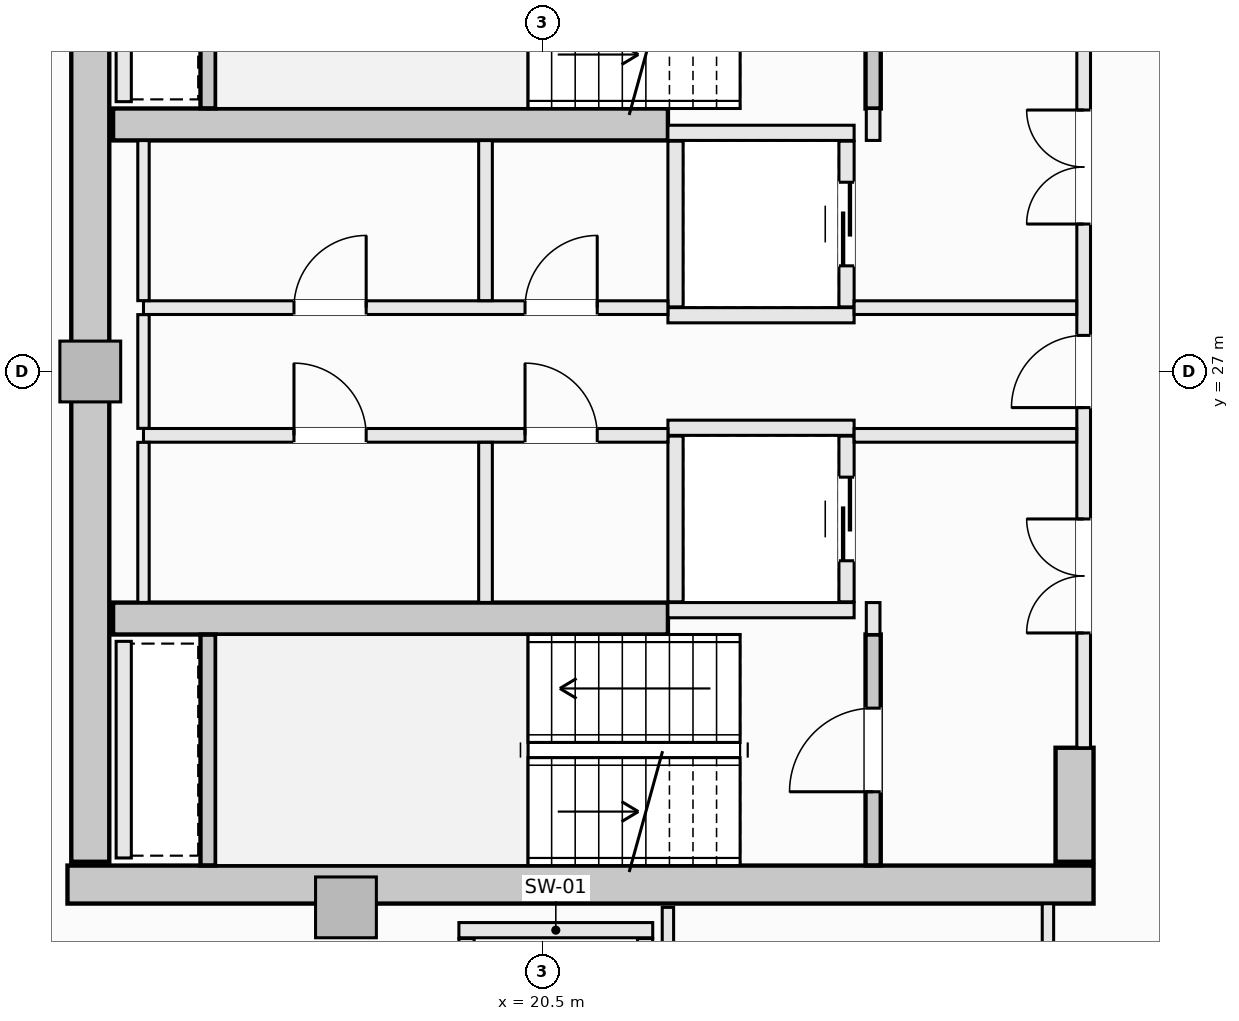
"""IFC4 building model, lengths in metres.
Left out: names, types, materials, properties, quantities, classifications, styles, units other than length and angle.
Written with IfcOpenShell. Run it as: python <this file> out.ifc"""

import sys

from ifc_helpers import new_model, si_unit, direction, frame, frame_2d, origin, origin_2d, place, context, subcontext, project, spatial, rectangle, extrude, element, fill, save


model = new_model("IFC4")
c1 = context("Model", 3, precision=1e-05, world=origin(), true_north=direction((0.0, 1.0)))
c2 = subcontext(c1, "Body", "Model", "MODEL_VIEW")
j1 = project(units=[si_unit("LENGTHUNIT", "METRE"), si_unit("PLANEANGLEUNIT", "RADIAN")], contexts=[c1])
p1 = place(None, origin())
s1 = spatial("IfcSite", under=j1, at=p1, CompositionType="ELEMENT")
p2 = place(p1, origin())
s2 = spatial("IfcBuilding", under=s1, at=p2, CompositionType="ELEMENT")
p3 = place(p2, frame((0.0, 0.0, 269.0)))
s3 = spatial("IfcBuildingStorey", under=s2, at=p3, CompositionType="ELEMENT", Elevation=269.0)
p4 = place(p3, frame((14.25, 20.25, -0.27), z_axis=(0.0, 0.0, 1.0), x_axis=(1.0, 0.0, 0.0)))
e1 = element("IfcWall", 1, at=p4, inside=s3, PredefinedType="SHEAR", context=c2, shape_type="SweptSolid", body=[
    extrude(rectangle(XDim=13.5, YDim=0.5, at=frame_2d((6.75, 0.0))), origin(), (0.0, 0.0, 1.0), 3.3),
])
p5 = place(p3, frame((14.55, 20.55, -0.27), z_axis=(0.0, 0.0, 1.0), x_axis=(0.0, 1.0, 0.0)))
e2 = element("IfcWall", 2, at=p5, inside=s3, PredefinedType="SHEAR", context=c2, shape_type="SweptSolid", body=[
    extrude(rectangle(XDim=12.9, YDim=0.5, at=frame_2d((6.45, 0.0))), origin(), (0.0, 0.0, 1.0), 3.3),
])
p6 = place(p3, frame((27.5, 20.55, -0.27), z_axis=(0.0, 0.0, 1.0), x_axis=(0.0, 1.0, 0.0)))
e3 = element("IfcWall", 3, at=p6, inside=s3, PredefinedType="SHEAR", context=c2, shape_type="SweptSolid", body=[
    extrude(rectangle(XDim=1.5, YDim=0.5, at=frame_2d((0.75, 0.0))), origin(), (0.0, 0.0, 1.0), 3.3),
])
for number, where, z_axis, x_axis in (
    (4, (14.85, 30.25, -0.27), (0.0, 0.0, 1.0), (1.0, 0.0, 0.0)),
    (5, (14.85, 23.75, -0.27), (0.0, 0.0, 1.0), (1.0, 0.0, 0.0)),
):
    element("IfcWall", number, at=place(p3, frame(where, z_axis=z_axis, x_axis=x_axis)), inside=s3, PredefinedType="SHEAR", context=c2, shape_type="SweptSolid", body=[
        extrude(rectangle(XDim=7.3, YDim=0.42, at=frame_2d((3.65, 0.0))), origin(), (0.0, 0.0, 1.0), 3.3),
    ])
for number, where, z_axis, x_axis in (
    (6, (14.55, 27.0, -0.27), (0.0, 0.0, 1.0), (1.0, 0.0, 0.0)),
    (7, (17.914, 19.95, -0.27), (0.0, 0.0, 1.0), (1.0, 0.0, 0.0)),
):
    element("IfcColumn", number, at=place(p3, frame(where, z_axis=z_axis, x_axis=x_axis)), inside=s3, PredefinedType="PILASTER", context=c2, shape_type="SweptSolid", body=[
        extrude(rectangle(XDim=0.8, YDim=0.8, at=origin_2d()), origin(), (0.0, 0.0, 1.0), 3.3),
    ])
p7 = place(p3, frame((24.85, 30.46, -0.27), z_axis=(0.0, 0.0, 1.0), x_axis=(0.0, 1.0, 0.0)))
e8 = element("IfcWall", 8, at=p7, inside=s3, PredefinedType="SHEAR", context=c2, shape_type="SweptSolid", body=[
    extrude(rectangle(XDim=3.038, YDim=0.2, at=frame_2d((1.519, 0.0))), origin(), (0.0, 0.0, 1.0), 3.3),
])
p8 = place(p7, frame((0.969, 0.0, 0.27)))
e9 = element("IfcOpeningElement", 9, at=p8, cuts=e8, PredefinedType="OPENING", context=c2, shape_type="SweptSolid", body=[
    extrude(rectangle(XDim=1.1, YDim=2.15, at=frame_2d((0.55, 1.075))), frame((0.0, 0.11, 0.0), z_axis=(0.0, -1.0, 0.0), x_axis=(1.0, 0.0, 0.0)), (0.0, 0.0, 1.0), 0.22),
])
p9 = place(p3, frame((16.1, 30.462, -0.27), z_axis=(0.0, 0.0, 1.0), x_axis=(0.0, 1.0, 0.0)))
e10 = element("IfcWall", 10, at=p9, inside=s3, PredefinedType="SHEAR", context=c2, shape_type="SweptSolid", body=[
    extrude(rectangle(XDim=3.036, YDim=0.2, at=frame_2d((1.518, 0.0))), origin(), (0.0, 0.0, 1.0), 3.3),
])
p10 = place(p3, frame((24.85, 20.502, -0.27), z_axis=(0.0, 0.0, 1.0), x_axis=(0.0, 1.0, 0.0)))
e11 = element("IfcWall", 11, at=p10, inside=s3, PredefinedType="SHEAR", context=c2, shape_type="SweptSolid", body=[
    extrude(rectangle(XDim=3.038, YDim=0.2, at=frame_2d((1.519, 0.0))), origin(), (0.0, 0.0, 1.0), 3.3),
])
p11 = place(p10, frame((0.969, 0.0, 0.27)))
e12 = element("IfcOpeningElement", 12, at=p11, cuts=e11, PredefinedType="OPENING", context=c2, shape_type="SweptSolid", body=[
    extrude(rectangle(XDim=1.1, YDim=2.15, at=frame_2d((0.55, 1.075))), frame((0.0, 0.11, 0.0), z_axis=(0.0, -1.0, 0.0), x_axis=(1.0, 0.0, 0.0)), (0.0, 0.0, 1.0), 0.22),
])
p12 = place(p3, frame((16.1, 20.502, -0.27), z_axis=(0.0, 0.0, 1.0), x_axis=(0.0, 1.0, 0.0)))
e13 = element("IfcWall", 13, at=p12, inside=s3, PredefinedType="SHEAR", context=c2, shape_type="SweptSolid", body=[
    extrude(rectangle(XDim=3.036, YDim=0.2, at=frame_2d((1.518, 0.0))), origin(), (0.0, 0.0, 1.0), 3.3),
])
for number, where, z_axis, x_axis in (
    (14, (22.15, 30.14, 0.0), (0.0, 0.0, 1.0), (1.0, 0.0, 0.0)),
    (15, (22.15, 27.74, 0.0), (0.0, 0.0, 1.0), (1.0, 0.0, 0.0)),
):
    element("IfcWall", number, at=place(p3, frame(where, z_axis=z_axis, x_axis=x_axis)), inside=s3, PredefinedType="SOLIDWALL", context=c2, shape_type="SweptSolid", body=[
        extrude(rectangle(XDim=2.45, YDim=0.2, at=frame_2d((1.225, 0.0))), origin(), (0.0, 0.0, 1.0), 3.03),
    ])
p13 = place(p3, frame((22.25, 27.85, 0.0), z_axis=(0.0, 0.0, 1.0), x_axis=(0.0, 1.0, 0.0)))
e16 = element("IfcWall", 16, at=p13, inside=s3, PredefinedType="SOLIDWALL", context=c2, shape_type="SweptSolid", body=[
    extrude(rectangle(XDim=2.18, YDim=0.2, at=frame_2d((1.09, 0.0))), origin(), (0.0, 0.0, 1.0), 3.03),
])
p14 = place(p3, frame((24.5, 27.85, 0.0), z_axis=(0.0, 0.0, 1.0), x_axis=(0.0, 1.0, 0.0)))
e17 = element("IfcWall", 17, at=p14, inside=s3, PredefinedType="SOLIDWALL", context=c2, shape_type="SweptSolid", body=[
    extrude(rectangle(XDim=2.18, YDim=0.2, at=frame_2d((1.09, 0.0))), origin(), (0.0, 0.0, 1.0), 3.03),
])
p15 = place(p14, frame((0.54, 0.0, 0.0)))
e18 = element("IfcOpeningElement", 18, at=p15, cuts=e17, PredefinedType="OPENING", context=c2, shape_type="SweptSolid", body=[
    extrude(rectangle(XDim=1.1, YDim=2.2, at=frame_2d((0.55, 1.1))), frame((0.0, 0.11, 0.0), z_axis=(0.0, -1.0, 0.0), x_axis=(1.0, 0.0, 0.0)), (0.0, 0.0, 1.0), 0.22),
])
for number, where, z_axis, x_axis in (
    (19, (22.15, 26.26, 0.0), (0.0, 0.0, 1.0), (1.0, 0.0, 0.0)),
    (20, (22.15, 23.86, 0.0), (0.0, 0.0, 1.0), (1.0, 0.0, 0.0)),
):
    element("IfcWall", number, at=place(p3, frame(where, z_axis=z_axis, x_axis=x_axis)), inside=s3, PredefinedType="SOLIDWALL", context=c2, shape_type="SweptSolid", body=[
        extrude(rectangle(XDim=2.45, YDim=0.2, at=frame_2d((1.225, 0.0))), origin(), (0.0, 0.0, 1.0), 3.03),
    ])
p16 = place(p3, frame((22.25, 23.97, 0.0), z_axis=(0.0, 0.0, 1.0), x_axis=(0.0, 1.0, 0.0)))
e21 = element("IfcWall", 21, at=p16, inside=s3, PredefinedType="SOLIDWALL", context=c2, shape_type="SweptSolid", body=[
    extrude(rectangle(XDim=2.18, YDim=0.2, at=frame_2d((1.09, 0.0))), origin(), (0.0, 0.0, 1.0), 3.03),
])
p17 = place(p3, frame((24.5, 23.97, 0.0), z_axis=(0.0, 0.0, 1.0), x_axis=(0.0, 1.0, 0.0)))
e22 = element("IfcWall", 22, at=p17, inside=s3, PredefinedType="SOLIDWALL", context=c2, shape_type="SweptSolid", body=[
    extrude(rectangle(XDim=2.18, YDim=0.2, at=frame_2d((1.09, 0.0))), origin(), (0.0, 0.0, 1.0), 3.03),
])
p18 = place(p17, frame((0.54, 0.0, 0.0)))
e23 = element("IfcOpeningElement", 23, at=p18, cuts=e22, PredefinedType="OPENING", context=c2, shape_type="SweptSolid", body=[
    extrude(rectangle(XDim=1.1, YDim=2.2, at=frame_2d((0.55, 1.1))), frame((0.0, 0.11, 0.0), z_axis=(0.0, -1.0, 0.0), x_axis=(1.0, 0.0, 0.0)), (0.0, 0.0, 1.0), 0.22),
])
p19 = place(p3, frame((19.4, 19.65, 0.0), z_axis=(0.0, 0.0, 1.0), x_axis=(1.0, 0.0, 0.0)))
e24 = element("IfcWall", 24, at=p19, inside=s3, PredefinedType="SOLIDWALL", context=c2, shape_type="SweptSolid", body=[
    extrude(rectangle(XDim=2.55, YDim=0.2, at=frame_2d((1.275, 0.0))), origin(), (0.0, 0.0, 1.0), 3.03),
])
for number, where, z_axis, x_axis in (
    (25, (19.5, 17.01, 0.0), (0.0, 0.0, 1.0), (0.0, 1.0, 0.0)),
    (26, (21.85, 17.01, 0.0), (0.0, 0.0, 1.0), (0.0, 1.0, 0.0)),
):
    element("IfcWall", number, at=place(p3, frame(where, z_axis=z_axis, x_axis=x_axis)), inside=s3, PredefinedType="SOLIDWALL", context=c2, shape_type="SweptSolid", body=[
        extrude(rectangle(XDim=2.53, YDim=0.2, at=frame_2d((1.265, 0.0))), origin(), (0.0, 0.0, 1.0), 3.03),
    ])
for number, where, z_axis, x_axis in (
    (27, (14.99, 30.55, 0.0), (0.0, 0.0, 1.0), (0.0, 1.0, 0.0)),
    (28, (14.99, 20.6, 0.0), (0.0, 0.0, 1.0), (0.0, 1.0, 0.0)),
):
    element("IfcWall", number, at=place(p3, frame(where, z_axis=z_axis, x_axis=x_axis)), inside=s3, PredefinedType="SOLIDWALL", context=c2, shape_type="SweptSolid", body=[
        extrude(rectangle(XDim=2.85, YDim=0.2, at=frame_2d((1.425, 0.0))), origin(), (0.0, 0.0, 1.0), 3.03),
    ])
for number, where, z_axis, x_axis in (
    (29, (24.85, 23.54, 0.0), (0.0, 0.0, 1.0), (0.0, 1.0, 0.0)),
    (30, (24.85, 30.04, 0.0), (0.0, 0.0, 1.0), (0.0, 1.0, 0.0)),
):
    element("IfcWall", number, at=place(p3, frame(where, z_axis=z_axis, x_axis=x_axis)), inside=s3, PredefinedType="SOLIDWALL", context=c2, shape_type="SweptSolid", body=[
        extrude(rectangle(XDim=0.42, YDim=0.18, at=frame_2d((0.21, 0.0))), origin(), (0.0, 0.0, 1.0), 3.03),
    ])
p20 = place(p3, frame((27.62, 22.05, 0.0), z_axis=(0.0, 0.0, 1.0), x_axis=(0.0, 1.0, 0.0)))
e31 = element("IfcWall", 31, at=p20, inside=s3, PredefinedType="SOLIDWALL", context=c2, shape_type="SweptSolid", body=[
    extrude(rectangle(XDim=9.9, YDim=0.18, at=frame_2d((4.95, 0.0))), origin(), (0.0, 0.0, 1.0), 3.03),
])
p21 = place(p20, frame((4.475, 0.0, 0.0)))
e32 = element("IfcOpeningElement", 32, at=p21, cuts=e31, PredefinedType="OPENING", context=c2, shape_type="SweptSolid", body=[
    extrude(rectangle(XDim=0.95, YDim=2.1, at=frame_2d((0.475, 1.05))), frame((0.0, 0.1, 0.0), z_axis=(0.0, -1.0, 0.0), x_axis=(1.0, 0.0, 0.0)), (0.0, 0.0, 1.0), 0.2),
])
p22 = place(p20, frame((6.89, 0.0, 0.0)))
e33 = element("IfcOpeningElement", 33, at=p22, cuts=e31, PredefinedType="OPENING", context=c2, shape_type="SweptSolid", body=[
    extrude(rectangle(XDim=1.5, YDim=2.2, at=frame_2d((0.75, 1.1))), frame((0.0, 0.1, 0.0), z_axis=(0.0, -1.0, 0.0), x_axis=(1.0, 0.0, 0.0)), (0.0, 0.0, 1.0), 0.2),
])
p23 = place(p20, frame((1.51, 0.0, 0.0)))
e34 = element("IfcOpeningElement", 34, at=p23, cuts=e31, PredefinedType="OPENING", context=c2, shape_type="SweptSolid", body=[
    extrude(rectangle(XDim=1.5, YDim=2.2, at=frame_2d((0.75, 1.1))), frame((0.0, 0.1, 0.0), z_axis=(0.0, -1.0, 0.0), x_axis=(1.0, 0.0, 0.0)), (0.0, 0.0, 1.0), 0.2),
])
p24 = place(p3, frame((15.25, 27.84, 0.0), z_axis=(0.0, 0.0, 1.0), x_axis=(1.0, 0.0, 0.0)))
e35 = element("IfcWall", 35, at=p24, inside=s3, PredefinedType="SOLIDWALL", context=c2, shape_type="SweptSolid", body=[
    extrude(rectangle(XDim=6.9, YDim=0.18, at=frame_2d((3.45, 0.0))), origin(), (0.0, 0.0, 1.0), 3.03),
])
p25 = place(p24, frame((5.02, 0.0, 0.0)))
e36 = element("IfcOpeningElement", 36, at=p25, cuts=e35, PredefinedType="OPENING", context=c2, shape_type="SweptSolid", body=[
    extrude(rectangle(XDim=0.95, YDim=2.1, at=frame_2d((0.475, 1.05))), frame((0.0, 0.1, 0.0), z_axis=(0.0, -1.0, 0.0), x_axis=(1.0, 0.0, 0.0)), (0.0, 0.0, 1.0), 0.2),
])
p26 = place(p24, frame((1.98, 0.0, 0.0)))
e37 = element("IfcOpeningElement", 37, at=p26, cuts=e35, PredefinedType="OPENING", context=c2, shape_type="SweptSolid", body=[
    extrude(rectangle(XDim=0.95, YDim=2.1, at=frame_2d((0.475, 1.05))), frame((0.0, 0.1, 0.0), z_axis=(0.0, -1.0, 0.0), x_axis=(1.0, 0.0, 0.0)), (0.0, 0.0, 1.0), 0.2),
])
p27 = place(p3, frame((24.6, 27.84, 0.0), z_axis=(0.0, 0.0, 1.0), x_axis=(1.0, 0.0, 0.0)))
e38 = element("IfcWall", 38, at=p27, inside=s3, PredefinedType="SOLIDWALL", context=c2, shape_type="SweptSolid", body=[
    extrude(rectangle(XDim=2.928, YDim=0.18, at=frame_2d((1.464, 0.0))), origin(), (0.0, 0.0, 1.0), 3.03),
])
p28 = place(p3, frame((15.25, 26.16, 0.0), z_axis=(0.0, 0.0, 1.0), x_axis=(1.0, 0.0, 0.0)))
e39 = element("IfcWall", 39, at=p28, inside=s3, PredefinedType="SOLIDWALL", context=c2, shape_type="SweptSolid", body=[
    extrude(rectangle(XDim=6.9, YDim=0.18, at=frame_2d((3.45, 0.0))), origin(), (0.0, 0.0, 1.0), 3.03),
])
p29 = place(p28, frame((5.02, 0.0, 0.0)))
e40 = element("IfcOpeningElement", 40, at=p29, cuts=e39, PredefinedType="OPENING", context=c2, shape_type="SweptSolid", body=[
    extrude(rectangle(XDim=0.95, YDim=2.1, at=frame_2d((0.475, 1.05))), frame((0.0, 0.1, 0.0), z_axis=(0.0, -1.0, 0.0), x_axis=(1.0, 0.0, 0.0)), (0.0, 0.0, 1.0), 0.2),
])
p30 = place(p28, frame((1.98, 0.0, 0.0)))
e41 = element("IfcOpeningElement", 41, at=p30, cuts=e39, PredefinedType="OPENING", context=c2, shape_type="SweptSolid", body=[
    extrude(rectangle(XDim=0.95, YDim=2.1, at=frame_2d((0.475, 1.05))), frame((0.0, 0.1, 0.0), z_axis=(0.0, -1.0, 0.0), x_axis=(1.0, 0.0, 0.0)), (0.0, 0.0, 1.0), 0.2),
])
p31 = place(p3, frame((24.6, 26.16, 0.0), z_axis=(0.0, 0.0, 1.0), x_axis=(1.0, 0.0, 0.0)))
e42 = element("IfcWall", 42, at=p31, inside=s3, PredefinedType="SOLIDWALL", context=c2, shape_type="SweptSolid", body=[
    extrude(rectangle(XDim=2.928, YDim=0.18, at=frame_2d((1.464, 0.0))), origin(), (0.0, 0.0, 1.0), 3.03),
])
p32 = place(p3, frame((15.25, 23.962, 0.0), z_axis=(0.0, 0.0, 1.0), x_axis=(0.0, 1.0, 0.0)))
e43 = element("IfcWall", 43, at=p32, inside=s3, PredefinedType="PARTITIONING", context=c2, shape_type="SweptSolid", body=[
    extrude(rectangle(XDim=2.106, YDim=0.15, at=frame_2d((1.053, 0.0))), origin(), (0.0, 0.0, 1.0), 3.03),
])
p33 = place(p3, frame((15.25, 26.252, 0.0), z_axis=(0.0, 0.0, 1.0), x_axis=(0.0, 1.0, 0.0)))
e44 = element("IfcWall", 44, at=p33, inside=s3, PredefinedType="PARTITIONING", context=c2, shape_type="SweptSolid", body=[
    extrude(rectangle(XDim=1.496, YDim=0.15, at=frame_2d((0.748, 0.0))), origin(), (0.0, 0.0, 1.0), 3.03),
])
p34 = place(p3, frame((15.25, 27.932, 0.0), z_axis=(0.0, 0.0, 1.0), x_axis=(0.0, 1.0, 0.0)))
e45 = element("IfcWall", 45, at=p34, inside=s3, PredefinedType="PARTITIONING", context=c2, shape_type="SweptSolid", body=[
    extrude(rectangle(XDim=2.106, YDim=0.15, at=frame_2d((1.053, 0.0))), origin(), (0.0, 0.0, 1.0), 3.03),
])
for number, where, z_axis, x_axis in (
    (46, (19.75, 23.962, 0.0), (0.0, 0.0, 1.0), (0.0, 1.0, 0.0)),
    (47, (19.75, 27.932, 0.0), (0.0, 0.0, 1.0), (0.0, 1.0, 0.0)),
):
    element("IfcWall", number, at=place(p3, frame(where, z_axis=z_axis, x_axis=x_axis)), inside=s3, PredefinedType="SOLIDWALL", context=c2, shape_type="SweptSolid", body=[
        extrude(rectangle(XDim=2.106, YDim=0.18, at=frame_2d((1.053, 0.0))), origin(), (0.0, 0.0, 1.0), 3.03),
    ])
p35 = place(p3, frame((22.15, 17.127, 0.0), z_axis=(0.0, 0.0, 1.0), x_axis=(0.0, 1.0, 0.0)))
e48 = element("IfcWall", 48, at=p35, inside=s3, PredefinedType="PARTITIONING", context=c2, shape_type="SweptSolid", body=[
    extrude(rectangle(XDim=2.823, YDim=0.15, at=frame_2d((1.412, 0.0))), origin(), (0.0, 0.0, 1.0), 3.03),
])
p36 = place(p3, frame((27.15, 17.127, 0.0), z_axis=(0.0, 0.0, 1.0), x_axis=(0.0, 1.0, 0.0)))
e49 = element("IfcWall", 49, at=p36, inside=s3, PredefinedType="PARTITIONING", context=c2, shape_type="SweptSolid", body=[
    extrude(rectangle(XDim=2.871, YDim=0.15, at=frame_2d((1.436, 0.0))), origin(), (0.0, 0.0, 1.0), 3.03),
])
p37 = place(p36, frame((0.96, 0.0, 0.0)))
e50 = element("IfcOpeningElement", 50, at=p37, cuts=e49, PredefinedType="OPENING", context=c2, shape_type="SweptSolid", body=[
    extrude(rectangle(XDim=0.95, YDim=2.1, at=frame_2d((0.475, 1.05))), frame((0.0, 0.085, 0.0), z_axis=(0.0, -1.0, 0.0), x_axis=(1.0, 0.0, 0.0)), (0.0, 0.0, 1.0), 0.17),
])
p38 = place(p11, origin())
e51 = element("IfcDoor", 51, at=p38, inside=s3, OperationType="SINGLE_SWING_LEFT", PredefinedType="DOOR", context=c2, shape_type="SweptSolid", body=[
    extrude(rectangle(XDim=1.1, YDim=2.15, at=frame_2d((0.55, 1.075))), frame((0.0, 0.025, 0.0), z_axis=(0.0, -1.0, 0.0), x_axis=(1.0, 0.0, 0.0)), (0.0, 0.0, 1.0), 0.05),
])
fill(e12, e51)
p39 = place(p15, origin())
e52 = element("IfcDoor", 52, at=p39, inside=s3, OperationType="SLIDING_TO_LEFT", PredefinedType="DOOR", context=c2, shape_type="SweptSolid", body=[
    extrude(rectangle(XDim=1.1, YDim=2.2, at=frame_2d((0.55, 1.1))), frame((0.0, 0.025, 0.0), z_axis=(0.0, -1.0, 0.0), x_axis=(1.0, 0.0, 0.0)), (0.0, 0.0, 1.0), 0.05),
])
fill(e18, e52)
p40 = place(p18, origin())
e53 = element("IfcDoor", 53, at=p40, inside=s3, OperationType="SLIDING_TO_LEFT", PredefinedType="DOOR", context=c2, shape_type="SweptSolid", body=[
    extrude(rectangle(XDim=1.1, YDim=2.2, at=frame_2d((0.55, 1.1))), frame((0.0, 0.025, 0.0), z_axis=(0.0, -1.0, 0.0), x_axis=(1.0, 0.0, 0.0)), (0.0, 0.0, 1.0), 0.05),
])
fill(e23, e53)
p41 = place(p21, origin())
e54 = element("IfcDoor", 54, at=p41, inside=s3, OperationType="SINGLE_SWING_LEFT", PredefinedType="DOOR", context=c2, shape_type="SweptSolid", body=[
    extrude(rectangle(XDim=0.95, YDim=2.1, at=frame_2d((0.475, 1.05))), frame((0.0, 0.025, 0.0), z_axis=(0.0, -1.0, 0.0), x_axis=(1.0, 0.0, 0.0)), (0.0, 0.0, 1.0), 0.05),
])
fill(e32, e54)
p42 = place(p22, origin())
e55 = element("IfcDoor", 55, at=p42, inside=s3, OperationType="DOUBLE_DOOR_SINGLE_SWING", PredefinedType="DOOR", context=c2, shape_type="SweptSolid", body=[
    extrude(rectangle(XDim=1.5, YDim=2.2, at=frame_2d((0.75, 1.1))), frame((0.0, 0.025, 0.0), z_axis=(0.0, -1.0, 0.0), x_axis=(1.0, 0.0, 0.0)), (0.0, 0.0, 1.0), 0.05),
])
fill(e33, e55)
p43 = place(p23, origin())
e56 = element("IfcDoor", 56, at=p43, inside=s3, OperationType="DOUBLE_DOOR_SINGLE_SWING", PredefinedType="DOOR", context=c2, shape_type="SweptSolid", body=[
    extrude(rectangle(XDim=1.5, YDim=2.2, at=frame_2d((0.75, 1.1))), frame((0.0, 0.025, 0.0), z_axis=(0.0, -1.0, 0.0), x_axis=(1.0, 0.0, 0.0)), (0.0, 0.0, 1.0), 0.05),
])
fill(e34, e56)
p44 = place(p25, origin())
e57 = element("IfcDoor", 57, at=p44, inside=s3, OperationType="SINGLE_SWING_RIGHT", PredefinedType="DOOR", context=c2, shape_type="SweptSolid", body=[
    extrude(rectangle(XDim=0.95, YDim=2.1, at=frame_2d((0.475, 1.05))), frame((0.0, 0.025, 0.0), z_axis=(0.0, -1.0, 0.0), x_axis=(1.0, 0.0, 0.0)), (0.0, 0.0, 1.0), 0.05),
])
fill(e36, e57)
p45 = place(p29, origin())
e58 = element("IfcDoor", 58, at=p45, inside=s3, OperationType="SINGLE_SWING_LEFT", PredefinedType="DOOR", context=c2, shape_type="SweptSolid", body=[
    extrude(rectangle(XDim=0.95, YDim=2.1, at=frame_2d((0.475, 1.05))), frame((0.0, 0.025, 0.0), z_axis=(0.0, -1.0, 0.0), x_axis=(1.0, 0.0, 0.0)), (0.0, 0.0, 1.0), 0.05),
])
fill(e40, e58)
p46 = place(p26, origin())
e59 = element("IfcDoor", 59, at=p46, inside=s3, OperationType="SINGLE_SWING_RIGHT", PredefinedType="DOOR", context=c2, shape_type="SweptSolid", body=[
    extrude(rectangle(XDim=0.95, YDim=2.1, at=frame_2d((0.475, 1.05))), frame((0.0, 0.025, 0.0), z_axis=(0.0, -1.0, 0.0), x_axis=(1.0, 0.0, 0.0)), (0.0, 0.0, 1.0), 0.05),
])
fill(e37, e59)
p47 = place(p30, origin())
e60 = element("IfcDoor", 60, at=p47, inside=s3, OperationType="SINGLE_SWING_LEFT", PredefinedType="DOOR", context=c2, shape_type="SweptSolid", body=[
    extrude(rectangle(XDim=0.95, YDim=2.1, at=frame_2d((0.475, 1.05))), frame((0.0, 0.025, 0.0), z_axis=(0.0, -1.0, 0.0), x_axis=(1.0, 0.0, 0.0)), (0.0, 0.0, 1.0), 0.05),
])
fill(e41, e60)
save(model, sys.argv[1])
